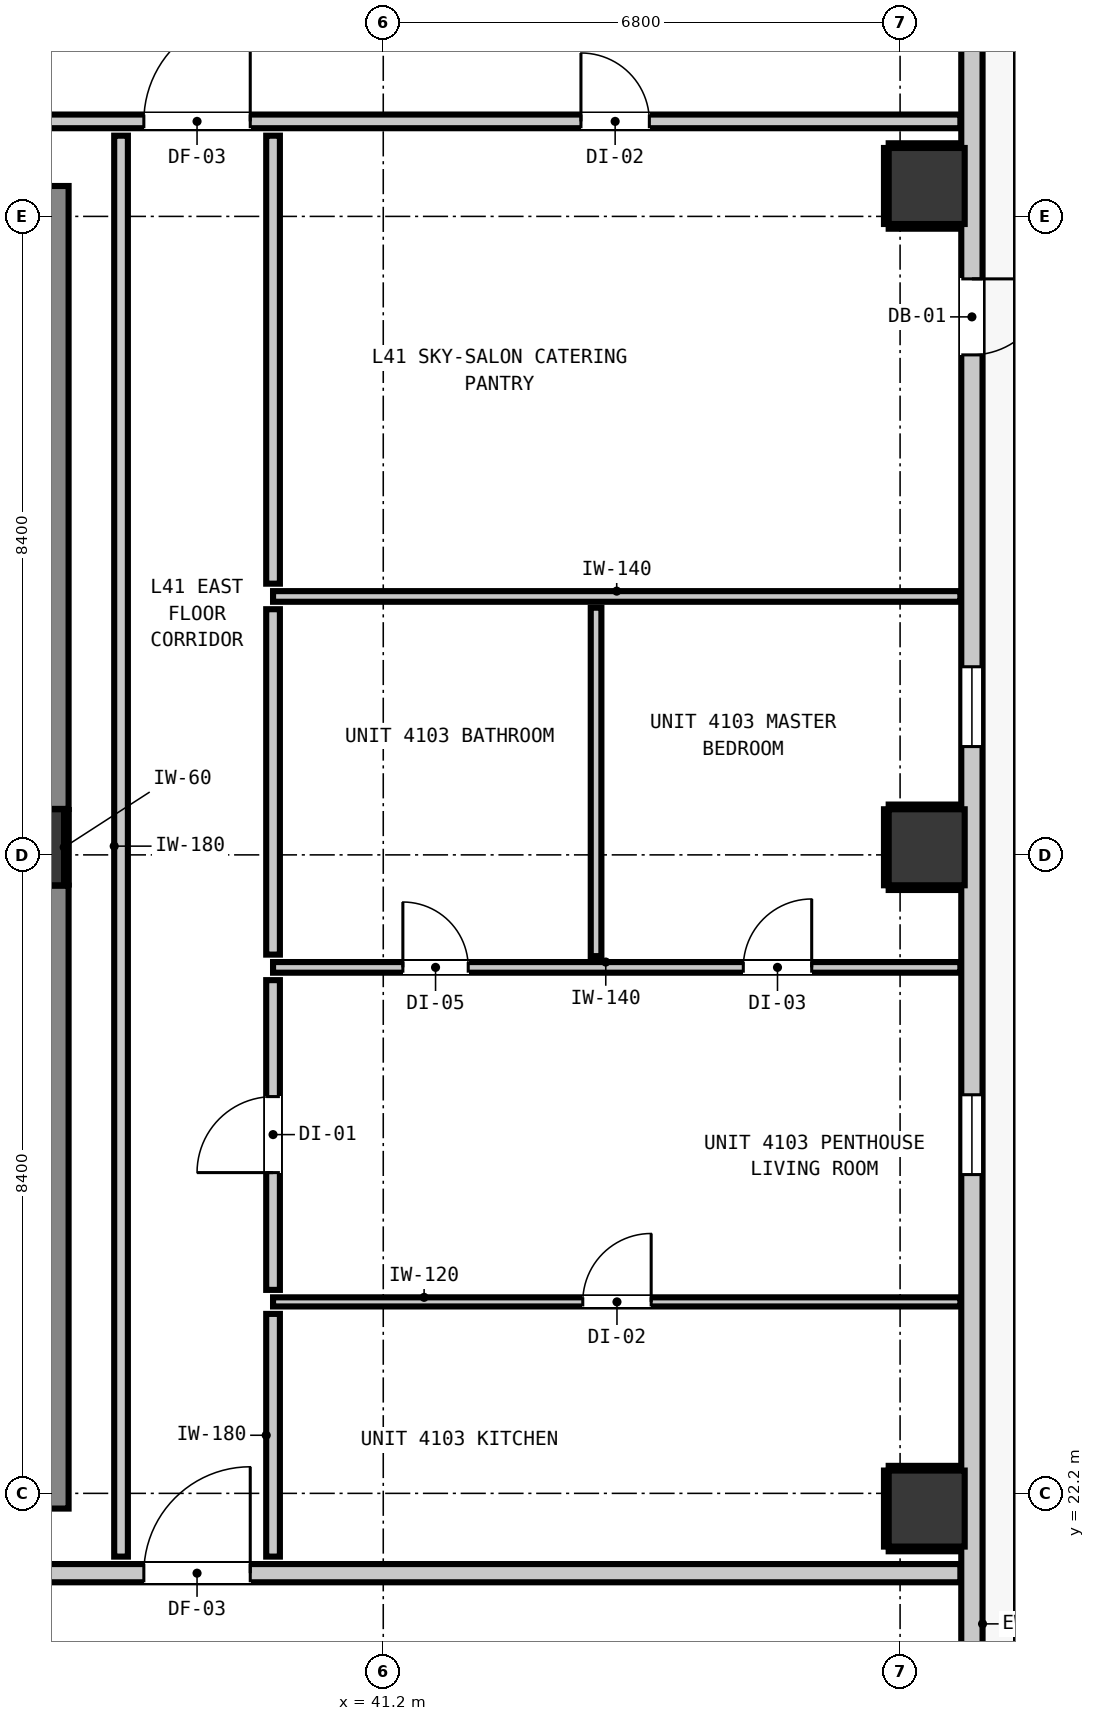
"""IFC4 building model, lengths in metres.
Left out: names, types, materials, properties, quantities, classifications, styles, units other than length and angle.
Written with IfcOpenShell. Run it as: python <this file> out.ifc"""

import sys

from ifc_helpers import new_model, si_unit, direction, frame, frame_2d, origin, origin_2d, place, context, subcontext, project, spatial, rectangle, extrude, element, fill, save


model = new_model("IFC4")
c1 = context("Model", 3, precision=1e-05, world=origin(), true_north=direction((0.0, 1.0)))
c2 = subcontext(c1, "Body", "Model", "MODEL_VIEW")
j1 = project(units=[si_unit("LENGTHUNIT", "METRE"), si_unit("PLANEANGLEUNIT", "RADIAN")], contexts=[c1])
p1 = place(None, origin())
s1 = spatial("IfcSite", under=j1, at=p1, CompositionType="ELEMENT")
p2 = place(p1, origin())
s2 = spatial("IfcBuilding", under=s1, at=p2, CompositionType="ELEMENT")
p3 = place(p2, frame((0.0, 0.0, 142.6)))
s3 = spatial("IfcBuildingStorey", under=s2, at=p3, CompositionType="ELEMENT", Elevation=142.6)
p4 = place(p3, frame((36.5, 30.7, 0.0), z_axis=(0.0, 0.0, 1.0), x_axis=(1.0, 0.0, 0.0)))
e1 = element("IfcColumn", 1, at=p4, inside=s3, PredefinedType="COLUMN", context=c2, shape_type="SweptSolid", body=[
    extrude(rectangle(XDim=1.0, YDim=1.0, at=origin_2d()), origin(), (0.0, 0.0, 1.0), 3.32),
])
p5 = place(p3, frame((36.56, 22.0, 0.0), z_axis=(0.0, 0.0, 1.0), x_axis=(0.0, 1.0, 0.0)))
e2 = element("IfcWall", 2, at=p5, inside=s3, PredefinedType="SHEAR", context=c2, shape_type="SweptSolid", body=[
    extrude(rectangle(XDim=8.195, YDim=1.0, at=frame_2d((4.098, 0.0))), origin(), (0.0, 0.0, 1.0), 3.32),
])
p6 = place(p3, frame((36.56, 31.205, 0.0), z_axis=(0.0, 0.0, 1.0), x_axis=(0.0, 1.0, 0.0)))
e3 = element("IfcWall", 3, at=p6, inside=s3, PredefinedType="SHEAR", context=c2, shape_type="SweptSolid", body=[
    extrude(rectangle(XDim=8.195, YDim=1.0, at=frame_2d((4.097, 0.0))), origin(), (0.0, 0.0, 1.0), 3.32),
])
for number, where, z_axis, x_axis in (
    (4, (48.35, 22.0, 0.0), (0.0, 0.0, 1.0), (1.0, 0.0, 0.0)),
    (5, (48.35, 30.7, 0.0), (0.0, 0.0, 1.0), (1.0, 0.0, 0.0)),
    (6, (48.35, 39.4, 0.0), (0.0, 0.0, 1.0), (1.0, 0.0, 0.0)),
):
    element("IfcColumn", number, at=place(p3, frame(where, z_axis=z_axis, x_axis=x_axis)), inside=s3, PredefinedType="COLUMN", context=c2, shape_type="SweptSolid", body=[
        extrude(rectangle(XDim=1.0, YDim=1.0, at=origin_2d()), origin(), (0.0, 0.0, 1.0), 2.9),
    ])
p7 = place(p3, frame((48.945, 43.645, 0.0), z_axis=(0.0, 0.0, 1.0), x_axis=(0.0, -1.0, 0.0)))
e7 = element("IfcWall", 7, at=p7, inside=s3, PredefinedType="STANDARD", context=c2, shape_type="SweptSolid", body=[
    extrude(rectangle(XDim=32.29, YDim=0.28, at=frame_2d((16.145, 0.0))), origin(), (0.0, 0.0, 1.0), 2.9),
])
p8 = place(p7, frame((5.467, 0.0, 0.0)))
e8 = element("IfcOpeningElement", 8, at=p8, cuts=e7, PredefinedType="OPENING", context=c2, shape_type="SweptSolid", body=[
    extrude(rectangle(XDim=1.0, YDim=2.15, at=frame_2d((0.5, 1.075))), frame((0.0, 0.15, 0.0), z_axis=(0.0, -1.0, 0.0), x_axis=(1.0, 0.0, 0.0)), (0.0, 0.0, 1.0), 0.3),
])
p9 = place(p7, frame((29.073, 0.0, 0.85)))
e9 = element("IfcOpeningElement", 9, at=p9, cuts=e7, PredefinedType="OPENING", context=c2, shape_type="SweptSolid", body=[
    extrude(rectangle(XDim=1.05, YDim=1.65, at=frame_2d((0.525, 0.825))), frame((0.0, 0.15, 0.0), z_axis=(0.0, -1.0, 0.0), x_axis=(1.0, 0.0, 0.0)), (0.0, 0.0, 1.0), 0.3),
])
p10 = place(p7, frame((0.318, 0.0, 0.85)))
e10 = element("IfcOpeningElement", 10, at=p10, cuts=e7, PredefinedType="OPENING", context=c2, shape_type="SweptSolid", body=[
    extrude(rectangle(XDim=1.05, YDim=1.65, at=frame_2d((0.525, 0.825))), frame((0.0, 0.15, 0.0), z_axis=(0.0, -1.0, 0.0), x_axis=(1.0, 0.0, 0.0)), (0.0, 0.0, 1.0), 0.3),
])
p11 = place(p7, frame((16.201, 0.0, 0.85)))
e11 = element("IfcOpeningElement", 11, at=p11, cuts=e7, PredefinedType="OPENING", context=c2, shape_type="SweptSolid", body=[
    extrude(rectangle(XDim=1.05, YDim=1.65, at=frame_2d((0.525, 0.825))), frame((0.0, 0.15, 0.0), z_axis=(0.0, -1.0, 0.0), x_axis=(1.0, 0.0, 0.0)), (0.0, 0.0, 1.0), 0.3),
])
p12 = place(p7, frame((10.57, 0.0, 0.85)))
e12 = element("IfcOpeningElement", 12, at=p12, cuts=e7, PredefinedType="OPENING", context=c2, shape_type="SweptSolid", body=[
    extrude(rectangle(XDim=1.05, YDim=1.65, at=frame_2d((0.525, 0.825))), frame((0.0, 0.15, 0.0), z_axis=(0.0, -1.0, 0.0), x_axis=(1.0, 0.0, 0.0)), (0.0, 0.0, 1.0), 0.3),
])
p13 = place(p3, frame((9.407, 21.15, 0.0), z_axis=(0.0, 0.0, 1.0), x_axis=(1.0, 0.0, 0.0)))
e13 = element("IfcWall", 13, at=p13, inside=s3, PredefinedType="PARTITIONING", context=c2, shape_type="SweptSolid", body=[
    extrude(rectangle(XDim=39.386, YDim=0.24, at=frame_2d((19.693, 0.0))), origin(), (0.0, 0.0, 1.0), 2.9),
])
p14 = place(p13, frame((8.803, 0.0, 0.0)))
e14 = element("IfcOpeningElement", 14, at=p14, cuts=e13, PredefinedType="OPENING", context=c2, shape_type="SweptSolid", body=[
    extrude(rectangle(XDim=1.1, YDim=2.15, at=frame_2d((0.55, 1.075))), frame((0.0, 0.13, 0.0), z_axis=(0.0, -1.0, 0.0), x_axis=(1.0, 0.0, 0.0)), (0.0, 0.0, 1.0), 0.26),
])
p15 = place(p13, frame((1.192, 0.0, 0.0)))
e15 = element("IfcOpeningElement", 15, at=p15, cuts=e13, PredefinedType="OPENING", context=c2, shape_type="SweptSolid", body=[
    extrude(rectangle(XDim=1.4, YDim=2.15, at=frame_2d((0.7, 1.075))), frame((0.0, 0.13, 0.0), z_axis=(0.0, -1.0, 0.0), x_axis=(1.0, 0.0, 0.0)), (0.0, 0.0, 1.0), 0.26),
])
p16 = place(p13, frame((28.643, 0.0, 0.0)))
e16 = element("IfcOpeningElement", 16, at=p16, cuts=e13, PredefinedType="OPENING", context=c2, shape_type="SweptSolid", body=[
    extrude(rectangle(XDim=1.4, YDim=2.15, at=frame_2d((0.7, 1.075))), frame((0.0, 0.13, 0.0), z_axis=(0.0, -1.0, 0.0), x_axis=(1.0, 0.0, 0.0)), (0.0, 0.0, 1.0), 0.26),
])
p17 = place(p3, frame((9.407, 40.25, 0.0), z_axis=(0.0, 0.0, 1.0), x_axis=(1.0, 0.0, 0.0)))
e17 = element("IfcWall", 17, at=p17, inside=s3, PredefinedType="PARTITIONING", context=c2, shape_type="SweptSolid", body=[
    extrude(rectangle(XDim=39.386, YDim=0.18, at=frame_2d((19.693, 0.0))), origin(), (0.0, 0.0, 1.0), 2.9),
])
p18 = place(p17, frame((8.028, 0.0, 0.0)))
e18 = element("IfcOpeningElement", 18, at=p18, cuts=e17, PredefinedType="OPENING", context=c2, shape_type="SweptSolid", body=[
    extrude(rectangle(XDim=1.4, YDim=2.15, at=frame_2d((0.7, 1.075))), frame((0.0, 0.1, 0.0), z_axis=(0.0, -1.0, 0.0), x_axis=(1.0, 0.0, 0.0)), (0.0, 0.0, 1.0), 0.2),
])
p19 = place(p17, frame((1.192, 0.0, 0.0)))
e19 = element("IfcOpeningElement", 19, at=p19, cuts=e17, PredefinedType="OPENING", context=c2, shape_type="SweptSolid", body=[
    extrude(rectangle(XDim=1.4, YDim=2.15, at=frame_2d((0.7, 1.075))), frame((0.0, 0.1, 0.0), z_axis=(0.0, -1.0, 0.0), x_axis=(1.0, 0.0, 0.0)), (0.0, 0.0, 1.0), 0.2),
])
p20 = place(p17, frame((28.643, 0.0, 0.0)))
e20 = element("IfcOpeningElement", 20, at=p20, cuts=e17, PredefinedType="OPENING", context=c2, shape_type="SweptSolid", body=[
    extrude(rectangle(XDim=1.4, YDim=2.15, at=frame_2d((0.7, 1.075))), frame((0.0, 0.1, 0.0), z_axis=(0.0, -1.0, 0.0), x_axis=(1.0, 0.0, 0.0)), (0.0, 0.0, 1.0), 0.2),
])
p21 = place(p17, frame((34.394, 0.0, 0.0)))
e21 = element("IfcOpeningElement", 21, at=p21, cuts=e17, PredefinedType="OPENING", context=c2, shape_type="SweptSolid", body=[
    extrude(rectangle(XDim=0.9, YDim=2.1, at=frame_2d((0.45, 1.05))), frame((0.0, 0.1, 0.0), z_axis=(0.0, -1.0, 0.0), x_axis=(1.0, 0.0, 0.0)), (0.0, 0.0, 1.0), 0.2),
])
p22 = place(p3, frame((39.75, 29.12, 0.0), z_axis=(0.0, 0.0, 1.0), x_axis=(1.0, 0.0, 0.0)))
e22 = element("IfcWall", 22, at=p22, inside=s3, PredefinedType="PARTITIONING", context=c2, shape_type="SweptSolid", body=[
    extrude(rectangle(XDim=9.043, YDim=0.14, at=frame_2d((4.521, 0.0))), origin(), (0.0, 0.0, 1.0), 2.9),
])
p23 = place(p22, frame((1.708, 0.0, 0.0)))
e23 = element("IfcOpeningElement", 23, at=p23, cuts=e22, PredefinedType="OPENING", context=c2, shape_type="SweptSolid", body=[
    extrude(rectangle(XDim=0.86, YDim=2.02, at=frame_2d((0.43, 1.01))), frame((0.0, 0.08, 0.0), z_axis=(0.0, -1.0, 0.0), x_axis=(1.0, 0.0, 0.0)), (0.0, 0.0, 1.0), 0.16),
])
p24 = place(p22, frame((6.187, 0.0, 0.0)))
e24 = element("IfcOpeningElement", 24, at=p24, cuts=e22, PredefinedType="OPENING", context=c2, shape_type="SweptSolid", body=[
    extrude(rectangle(XDim=0.9, YDim=2.1, at=frame_2d((0.45, 1.05))), frame((0.0, 0.08, 0.0), z_axis=(0.0, -1.0, 0.0), x_axis=(1.0, 0.0, 0.0)), (0.0, 0.0, 1.0), 0.16),
])
p25 = place(p3, frame((39.75, 34.0, 0.0), z_axis=(0.0, 0.0, 1.0), x_axis=(1.0, 0.0, 0.0)))
e25 = element("IfcWall", 25, at=p25, inside=s3, PredefinedType="PARTITIONING", context=c2, shape_type="SweptSolid", body=[
    extrude(rectangle(XDim=9.043, YDim=0.14, at=frame_2d((4.521, 0.0))), origin(), (0.0, 0.0, 1.0), 2.9),
])
p26 = place(p3, frame((39.75, 24.719, 0.0), z_axis=(0.0, 0.0, 1.0), x_axis=(1.0, 0.0, 0.0)))
e26 = element("IfcWall", 26, at=p26, inside=s3, PredefinedType="PARTITIONING", context=c2, shape_type="SweptSolid", body=[
    extrude(rectangle(XDim=9.043, YDim=0.12, at=frame_2d((4.521, 0.0))), origin(), (0.0, 0.0, 1.0), 2.9),
])
p27 = place(p26, frame((4.075, 0.0, 0.0)))
e27 = element("IfcOpeningElement", 27, at=p27, cuts=e26, PredefinedType="OPENING", context=c2, shape_type="SweptSolid", body=[
    extrude(rectangle(XDim=0.9, YDim=2.1, at=frame_2d((0.45, 1.05))), frame((0.0, 0.07, 0.0), z_axis=(0.0, -1.0, 0.0), x_axis=(1.0, 0.0, 0.0)), (0.0, 0.0, 1.0), 0.14),
])
p28 = place(p3, frame((37.75, 21.368, 0.0), z_axis=(0.0, 0.0, 1.0), x_axis=(0.0, 1.0, 0.0)))
e28 = element("IfcWall", 28, at=p28, inside=s3, PredefinedType="PARTITIONING", context=c2, shape_type="SweptSolid", body=[
    extrude(rectangle(XDim=18.694, YDim=0.18, at=frame_2d((9.347, 0.0))), origin(), (0.0, 0.0, 1.0), 2.9),
])
p29 = place(p3, frame((39.75, 21.368, 0.0), z_axis=(0.0, 0.0, 1.0), x_axis=(0.0, 1.0, 0.0)))
e29 = element("IfcWall", 29, at=p29, inside=s3, PredefinedType="PARTITIONING", context=c2, shape_type="SweptSolid", body=[
    extrude(rectangle(XDim=3.193, YDim=0.18, at=frame_2d((1.597, 0.0))), origin(), (0.0, 0.0, 1.0), 2.9),
])
p30 = place(p3, frame((39.75, 24.877, 0.0), z_axis=(0.0, 0.0, 1.0), x_axis=(0.0, 1.0, 0.0)))
e30 = element("IfcWall", 30, at=p30, inside=s3, PredefinedType="PARTITIONING", context=c2, shape_type="SweptSolid", body=[
    extrude(rectangle(XDim=4.075, YDim=0.18, at=frame_2d((2.038, 0.0))), origin(), (0.0, 0.0, 1.0), 2.9),
])
p31 = place(p30, frame((1.543, 0.0, 0.0)))
e31 = element("IfcOpeningElement", 31, at=p31, cuts=e30, PredefinedType="OPENING", context=c2, shape_type="SweptSolid", body=[
    extrude(rectangle(XDim=1.0, YDim=2.15, at=frame_2d((0.5, 1.075))), frame((0.0, 0.1, 0.0), z_axis=(0.0, -1.0, 0.0), x_axis=(1.0, 0.0, 0.0)), (0.0, 0.0, 1.0), 0.2),
])
p32 = place(p3, frame((39.75, 29.288, 0.0), z_axis=(0.0, 0.0, 1.0), x_axis=(0.0, 1.0, 0.0)))
e32 = element("IfcWall", 32, at=p32, inside=s3, PredefinedType="PARTITIONING", context=c2, shape_type="SweptSolid", body=[
    extrude(rectangle(XDim=4.544, YDim=0.18, at=frame_2d((2.272, 0.0))), origin(), (0.0, 0.0, 1.0), 2.9),
])
p33 = place(p3, frame((39.75, 34.168, 0.0), z_axis=(0.0, 0.0, 1.0), x_axis=(0.0, 1.0, 0.0)))
e33 = element("IfcWall", 33, at=p33, inside=s3, PredefinedType="PARTITIONING", context=c2, shape_type="SweptSolid", body=[
    extrude(rectangle(XDim=5.894, YDim=0.18, at=frame_2d((2.947, 0.0))), origin(), (0.0, 0.0, 1.0), 2.9),
])
p34 = place(p3, frame((44.0, 29.268, 0.0), z_axis=(0.0, 0.0, 1.0), x_axis=(0.0, 1.0, 0.0)))
e34 = element("IfcWall", 34, at=p34, inside=s3, PredefinedType="PARTITIONING", context=c2, shape_type="SweptSolid", body=[
    extrude(rectangle(XDim=4.584, YDim=0.14, at=frame_2d((2.292, 0.0))), origin(), (0.0, 0.0, 1.0), 2.9),
])
p35 = place(p3, frame((37.032, 30.21, 0.0), z_axis=(0.0, 0.0, 1.0), x_axis=(0.0, 1.0, 0.0)))
e35 = element("IfcWall", 35, at=p35, inside=s3, PredefinedType="PARTITIONING", context=c2, shape_type="SweptSolid", body=[
    extrude(rectangle(XDim=0.98, YDim=0.06, at=frame_2d((0.49, 0.0))), origin(), (0.0, 0.0, 1.0), 0.905),
])
for number, where, z_axis, x_axis in (
    (36, (47.85, 21.468, 0.0), (0.0, 0.0, 1.0), (1.0, 0.0, 0.0)),
    (37, (47.85, 22.532, 0.0), (0.0, 0.0, 1.0), (1.0, 0.0, 0.0)),
):
    element("IfcWall", number, at=place(p3, frame(where, z_axis=z_axis, x_axis=x_axis)), inside=s3, PredefinedType="PARTITIONING", context=c2, shape_type="SweptSolid", body=[
        extrude(rectangle(XDim=0.94, YDim=0.06, at=frame_2d((0.47, 0.0))), origin(), (0.0, 0.0, 1.0), 0.905),
    ])
p36 = place(p3, frame((47.818, 21.5, 0.0), z_axis=(0.0, 0.0, 1.0), x_axis=(0.0, 1.0, 0.0)))
e38 = element("IfcWall", 38, at=p36, inside=s3, PredefinedType="PARTITIONING", context=c2, shape_type="SweptSolid", body=[
    extrude(rectangle(XDim=1.0, YDim=0.06, at=frame_2d((0.5, 0.0))), origin(), (0.0, 0.0, 1.0), 1.45),
])
for number, where, z_axis, x_axis in (
    (39, (47.85, 30.168, 0.0), (0.0, 0.0, 1.0), (1.0, 0.0, 0.0)),
    (40, (47.85, 31.232, 0.0), (0.0, 0.0, 1.0), (1.0, 0.0, 0.0)),
):
    element("IfcWall", number, at=place(p3, frame(where, z_axis=z_axis, x_axis=x_axis)), inside=s3, PredefinedType="PARTITIONING", context=c2, shape_type="SweptSolid", body=[
        extrude(rectangle(XDim=0.94, YDim=0.06, at=frame_2d((0.47, 0.0))), origin(), (0.0, 0.0, 1.0), 0.905),
    ])
p37 = place(p3, frame((47.818, 30.2, 0.0), z_axis=(0.0, 0.0, 1.0), x_axis=(0.0, 1.0, 0.0)))
e41 = element("IfcWall", 41, at=p37, inside=s3, PredefinedType="PARTITIONING", context=c2, shape_type="SweptSolid", body=[
    extrude(rectangle(XDim=1.0, YDim=0.06, at=frame_2d((0.5, 0.0))), origin(), (0.0, 0.0, 1.0), 1.45),
])
for number, where, z_axis, x_axis in (
    (42, (47.85, 38.868, 0.0), (0.0, 0.0, 1.0), (1.0, 0.0, 0.0)),
    (43, (47.85, 39.932, 0.0), (0.0, 0.0, 1.0), (1.0, 0.0, 0.0)),
):
    element("IfcWall", number, at=place(p3, frame(where, z_axis=z_axis, x_axis=x_axis)), inside=s3, PredefinedType="PARTITIONING", context=c2, shape_type="SweptSolid", body=[
        extrude(rectangle(XDim=0.94, YDim=0.06, at=frame_2d((0.47, 0.0))), origin(), (0.0, 0.0, 1.0), 0.905),
    ])
p38 = place(p3, frame((47.818, 38.9, 0.0), z_axis=(0.0, 0.0, 1.0), x_axis=(0.0, 1.0, 0.0)))
e44 = element("IfcWall", 44, at=p38, inside=s3, PredefinedType="PARTITIONING", context=c2, shape_type="SweptSolid", body=[
    extrude(rectangle(XDim=1.0, YDim=0.06, at=frame_2d((0.5, 0.0))), origin(), (0.0, 0.0, 1.0), 1.45),
])
p39 = place(p8, origin())
e45 = element("IfcDoor", 45, at=p39, inside=s3, OperationType="SINGLE_SWING_LEFT", PredefinedType="DOOR", context=c2, shape_type="SweptSolid", body=[
    extrude(rectangle(XDim=1.0, YDim=2.15, at=frame_2d((0.5, 1.075))), frame((0.0, 0.025, 0.0), z_axis=(0.0, -1.0, 0.0), x_axis=(1.0, 0.0, 0.0)), (0.0, 0.0, 1.0), 0.05),
])
fill(e8, e45)
p40 = place(p11, origin())
e46 = element("IfcWindow", 46, at=p40, inside=s3, PartitioningType="SINGLE_PANEL", PredefinedType="WINDOW", context=c2, shape_type="SweptSolid", body=[
    extrude(rectangle(XDim=1.05, YDim=1.65, at=frame_2d((0.525, 0.825))), frame((0.0, 0.03, 0.0), z_axis=(0.0, -1.0, 0.0), x_axis=(1.0, 0.0, 0.0)), (0.0, 0.0, 1.0), 0.06),
])
fill(e11, e46)
p41 = place(p12, origin())
e47 = element("IfcWindow", 47, at=p41, inside=s3, PartitioningType="SINGLE_PANEL", PredefinedType="WINDOW", context=c2, shape_type="SweptSolid", body=[
    extrude(rectangle(XDim=1.05, YDim=1.65, at=frame_2d((0.525, 0.825))), frame((0.0, 0.03, 0.0), z_axis=(0.0, -1.0, 0.0), x_axis=(1.0, 0.0, 0.0)), (0.0, 0.0, 1.0), 0.06),
])
fill(e12, e47)
p42 = place(p16, origin())
e48 = element("IfcDoor", 48, at=p42, inside=s3, OperationType="SINGLE_SWING_RIGHT", PredefinedType="DOOR", context=c2, shape_type="SweptSolid", body=[
    extrude(rectangle(XDim=1.4, YDim=2.15, at=frame_2d((0.7, 1.075))), frame((0.0, 0.025, 0.0), z_axis=(0.0, -1.0, 0.0), x_axis=(1.0, 0.0, 0.0)), (0.0, 0.0, 1.0), 0.05),
])
fill(e16, e48)
p43 = place(p20, origin())
e49 = element("IfcDoor", 49, at=p43, inside=s3, OperationType="SINGLE_SWING_RIGHT", PredefinedType="DOOR", context=c2, shape_type="SweptSolid", body=[
    extrude(rectangle(XDim=1.4, YDim=2.15, at=frame_2d((0.7, 1.075))), frame((0.0, 0.025, 0.0), z_axis=(0.0, -1.0, 0.0), x_axis=(1.0, 0.0, 0.0)), (0.0, 0.0, 1.0), 0.05),
])
fill(e20, e49)
p44 = place(p31, origin())
e50 = element("IfcDoor", 50, at=p44, inside=s3, OperationType="SINGLE_SWING_LEFT", PredefinedType="DOOR", context=c2, shape_type="SweptSolid", body=[
    extrude(rectangle(XDim=1.0, YDim=2.15, at=frame_2d((0.5, 1.075))), frame((0.0, 0.025, 0.0), z_axis=(0.0, -1.0, 0.0), x_axis=(1.0, 0.0, 0.0)), (0.0, 0.0, 1.0), 0.05),
])
fill(e31, e50)
p45 = place(p27, origin())
e51 = element("IfcDoor", 51, at=p45, inside=s3, OperationType="SINGLE_SWING_RIGHT", PredefinedType="DOOR", context=c2, shape_type="SweptSolid", body=[
    extrude(rectangle(XDim=0.9, YDim=2.1, at=frame_2d((0.45, 1.05))), frame((0.0, 0.025, 0.0), z_axis=(0.0, -1.0, 0.0), x_axis=(1.0, 0.0, 0.0)), (0.0, 0.0, 1.0), 0.05),
])
fill(e27, e51)
p46 = place(p23, origin())
e52 = element("IfcDoor", 52, at=p46, inside=s3, OperationType="SINGLE_SWING_LEFT", PredefinedType="DOOR", context=c2, shape_type="SweptSolid", body=[
    extrude(rectangle(XDim=0.86, YDim=2.02, at=frame_2d((0.43, 1.01))), frame((0.0, 0.025, 0.0), z_axis=(0.0, -1.0, 0.0), x_axis=(1.0, 0.0, 0.0)), (0.0, 0.0, 1.0), 0.05),
])
fill(e23, e52)
p47 = place(p24, origin())
e53 = element("IfcDoor", 53, at=p47, inside=s3, OperationType="SINGLE_SWING_RIGHT", PredefinedType="DOOR", context=c2, shape_type="SweptSolid", body=[
    extrude(rectangle(XDim=0.9, YDim=2.1, at=frame_2d((0.45, 1.05))), frame((0.0, 0.025, 0.0), z_axis=(0.0, -1.0, 0.0), x_axis=(1.0, 0.0, 0.0)), (0.0, 0.0, 1.0), 0.05),
])
fill(e24, e53)
p48 = place(p21, origin())
e54 = element("IfcDoor", 54, at=p48, inside=s3, OperationType="SINGLE_SWING_LEFT", PredefinedType="DOOR", context=c2, shape_type="SweptSolid", body=[
    extrude(rectangle(XDim=0.9, YDim=2.1, at=frame_2d((0.45, 1.05))), frame((0.0, 0.025, 0.0), z_axis=(0.0, -1.0, 0.0), x_axis=(1.0, 0.0, 0.0)), (0.0, 0.0, 1.0), 0.05),
])
fill(e21, e54)
save(model, sys.argv[1])
